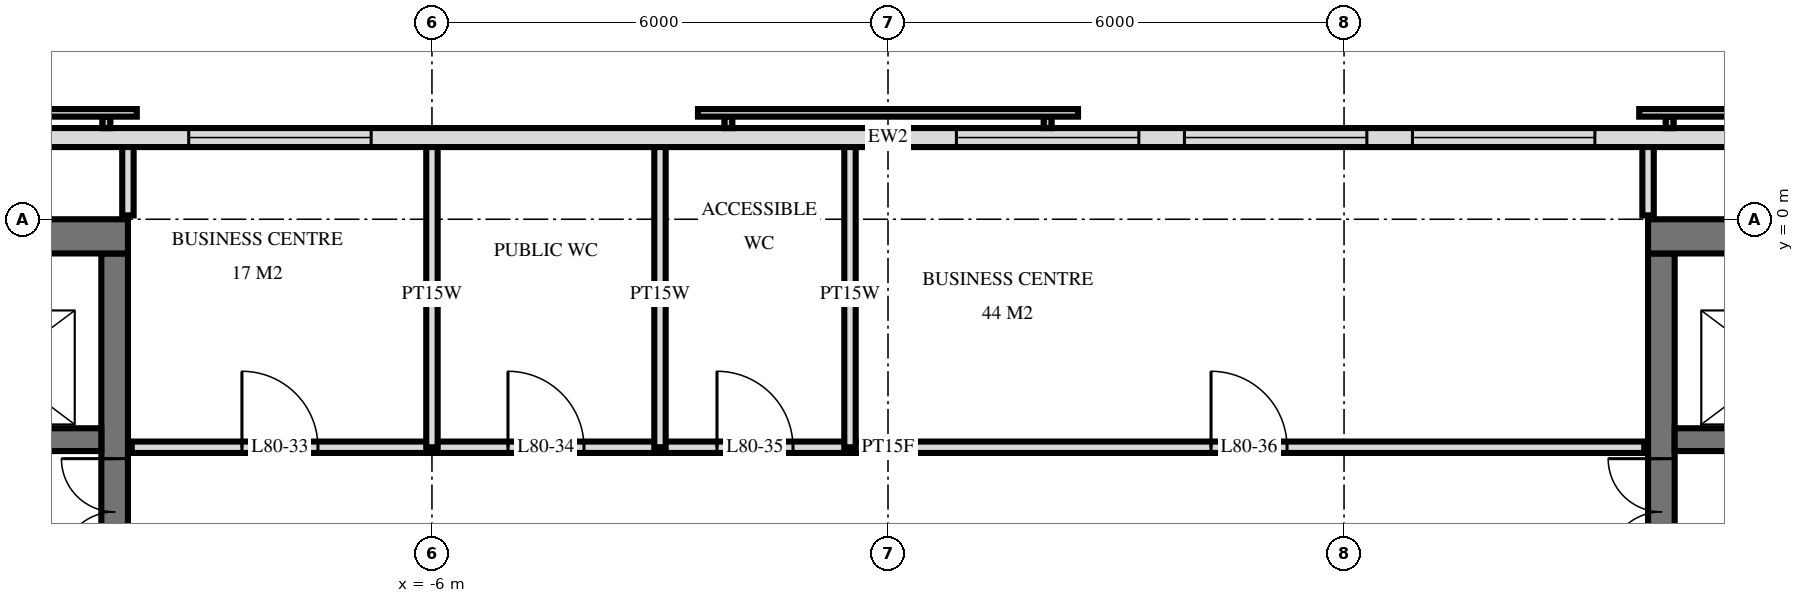
"""IFC4 building model, lengths in metres.
Left out: names, types, materials, properties, quantities, classifications, styles, units other than length and angle.
Written with IfcOpenShell. Run it as: python <this file> out.ifc"""

import sys

from ifc_helpers import new_model, si_unit, direction, frame, frame_2d, origin, place, context, subcontext, project, spatial, rectangle, extrude, element, fill, save


model = new_model("IFC4")
c1 = context("Model", 3, precision=1e-05, world=origin(), true_north=direction((0.0, 1.0)))
c2 = subcontext(c1, "Body", "Model", "MODEL_VIEW")
j1 = project(units=[si_unit("LENGTHUNIT", "METRE"), si_unit("PLANEANGLEUNIT", "RADIAN")], contexts=[c1])
p1 = place(None, origin())
s1 = spatial("IfcSite", under=j1, at=p1, CompositionType="ELEMENT")
p2 = place(p1, origin())
s2 = spatial("IfcBuilding", under=s1, at=p2, CompositionType="ELEMENT")
p3 = place(p2, frame((0.0, 0.0, 301.6)))
s3 = spatial("IfcBuildingStorey", under=s2, at=p3, CompositionType="ELEMENT", Elevation=301.6)
p4 = place(p3, frame((-19.5, -0.225, 0.0), z_axis=(0.0, 0.0, 1.0), x_axis=(1.0, 0.0, 0.0)))
e1 = element("IfcWall", 1, at=p4, inside=s3, PredefinedType="SHEAR", context=c2, shape_type="SweptSolid", body=[
    extrude(rectangle(XDim=9.5, YDim=0.45, at=frame_2d((4.75, 0.0))), origin(), (0.0, 0.0, 1.0), 3.5),
])
p5 = place(p3, frame((-10.175, -14.55, 0.0), z_axis=(0.0, 0.0, 1.0), x_axis=(0.0, 1.0, 0.0)))
e2 = element("IfcWall", 2, at=p5, inside=s3, PredefinedType="SHEAR", context=c2, shape_type="SweptSolid", body=[
    extrude(rectangle(XDim=14.1, YDim=0.35, at=frame_2d((7.05, 0.0))), origin(), (0.0, 0.0, 1.0), 3.5),
])
p6 = place(p5, frame((8.4, 0.0, 0.0)))
e3 = element("IfcOpeningElement", 3, at=p6, cuts=e2, PredefinedType="OPENING", context=c2, shape_type="SweptSolid", body=[
    extrude(rectangle(XDim=1.4, YDim=2.4, at=frame_2d((0.7, 1.2))), frame((0.0, 0.185, 0.0), z_axis=(0.0, -1.0, 0.0), x_axis=(1.0, 0.0, 0.0)), (0.0, 0.0, 1.0), 0.37),
])
p7 = place(p5, frame((10.0, 0.0, 0.0)))
e4 = element("IfcOpeningElement", 4, at=p7, cuts=e2, PredefinedType="OPENING", context=c2, shape_type="SweptSolid", body=[
    extrude(rectangle(XDim=1.4, YDim=2.4, at=frame_2d((0.7, 1.2))), frame((0.0, 0.185, 0.0), z_axis=(0.0, -1.0, 0.0), x_axis=(1.0, 0.0, 0.0)), (0.0, 0.0, 1.0), 0.37),
])
p8 = place(p5, frame((4.0, 0.0, 0.0)))
e5 = element("IfcOpeningElement", 5, at=p8, cuts=e2, PredefinedType="OPENING", context=c2, shape_type="SweptSolid", body=[
    extrude(rectangle(XDim=1.2, YDim=2.1, at=frame_2d((0.6, 1.05))), frame((0.0, 0.185, 0.0), z_axis=(0.0, -1.0, 0.0), x_axis=(1.0, 0.0, 0.0)), (0.0, 0.0, 1.0), 0.37),
])
p9 = place(p3, frame((-19.05, -2.9, 0.0), z_axis=(0.0, 0.0, 1.0), x_axis=(1.0, 0.0, 0.0)))
e6 = element("IfcWall", 6, at=p9, inside=s3, PredefinedType="SHEAR", context=c2, shape_type="SweptSolid", body=[
    extrude(rectangle(XDim=8.7, YDim=0.3, at=frame_2d((4.35, 0.0))), origin(), (0.0, 0.0, 1.0), 3.5),
])
p10 = place(p9, frame((6.8, 0.0, 0.0)))
e7 = element("IfcOpeningElement", 7, at=p10, cuts=e6, PredefinedType="OPENING", context=c2, shape_type="SweptSolid", body=[
    extrude(rectangle(XDim=1.1, YDim=2.1, at=frame_2d((0.55, 1.05))), frame((0.0, 0.16, 0.0), z_axis=(0.0, -1.0, 0.0), x_axis=(1.0, 0.0, 0.0)), (0.0, 0.0, 1.0), 0.32),
])
p11 = place(p9, frame((3.8, 0.0, 0.0)))
e8 = element("IfcOpeningElement", 8, at=p11, cuts=e6, PredefinedType="OPENING", context=c2, shape_type="SweptSolid", body=[
    extrude(rectangle(XDim=1.1, YDim=2.1, at=frame_2d((0.55, 1.05))), frame((0.0, 0.16, 0.0), z_axis=(0.0, -1.0, 0.0), x_axis=(1.0, 0.0, 0.0)), (0.0, 0.0, 1.0), 0.32),
])
p12 = place(p9, frame((1.863, 0.0, 0.0)))
e9 = element("IfcOpeningElement", 9, at=p12, cuts=e6, PredefinedType="OPENING", context=c2, shape_type="SweptSolid", body=[
    extrude(rectangle(XDim=0.9, YDim=2.1, at=frame_2d((0.45, 1.05))), frame((0.0, 0.16, 0.0), z_axis=(0.0, -1.0, 0.0), x_axis=(1.0, 0.0, 0.0)), (0.0, 0.0, 1.0), 0.32),
])
p13 = place(p9, frame((0.438, 0.0, 0.0)))
e10 = element("IfcOpeningElement", 10, at=p13, cuts=e6, PredefinedType="OPENING", context=c2, shape_type="SweptSolid", body=[
    extrude(rectangle(XDim=0.9, YDim=2.1, at=frame_2d((0.45, 1.05))), frame((0.0, 0.16, 0.0), z_axis=(0.0, -1.0, 0.0), x_axis=(1.0, 0.0, 0.0)), (0.0, 0.0, 1.0), 0.32),
])
p14 = place(p3, frame((10.0, -0.225, 0.0), z_axis=(0.0, 0.0, 1.0), x_axis=(1.0, 0.0, 0.0)))
e11 = element("IfcWall", 11, at=p14, inside=s3, PredefinedType="SHEAR", context=c2, shape_type="SweptSolid", body=[
    extrude(rectangle(XDim=9.5, YDim=0.45, at=frame_2d((4.75, 0.0))), origin(), (0.0, 0.0, 1.0), 3.5),
])
p15 = place(p3, frame((10.175, -14.55, 0.0), z_axis=(0.0, 0.0, 1.0), x_axis=(0.0, 1.0, 0.0)))
e12 = element("IfcWall", 12, at=p15, inside=s3, PredefinedType="SHEAR", context=c2, shape_type="SweptSolid", body=[
    extrude(rectangle(XDim=14.1, YDim=0.35, at=frame_2d((7.05, 0.0))), origin(), (0.0, 0.0, 1.0), 3.5),
])
p16 = place(p15, frame((8.4, 0.0, 0.0)))
e13 = element("IfcOpeningElement", 13, at=p16, cuts=e12, PredefinedType="OPENING", context=c2, shape_type="SweptSolid", body=[
    extrude(rectangle(XDim=1.4, YDim=2.4, at=frame_2d((0.7, 1.2))), frame((0.0, 0.185, 0.0), z_axis=(0.0, -1.0, 0.0), x_axis=(1.0, 0.0, 0.0)), (0.0, 0.0, 1.0), 0.37),
])
p17 = place(p15, frame((10.0, 0.0, 0.0)))
e14 = element("IfcOpeningElement", 14, at=p17, cuts=e12, PredefinedType="OPENING", context=c2, shape_type="SweptSolid", body=[
    extrude(rectangle(XDim=1.4, YDim=2.4, at=frame_2d((0.7, 1.2))), frame((0.0, 0.185, 0.0), z_axis=(0.0, -1.0, 0.0), x_axis=(1.0, 0.0, 0.0)), (0.0, 0.0, 1.0), 0.37),
])
p18 = place(p15, frame((4.0, 0.0, 0.0)))
e15 = element("IfcOpeningElement", 15, at=p18, cuts=e12, PredefinedType="OPENING", context=c2, shape_type="SweptSolid", body=[
    extrude(rectangle(XDim=1.2, YDim=2.1, at=frame_2d((0.6, 1.05))), frame((0.0, 0.185, 0.0), z_axis=(0.0, -1.0, 0.0), x_axis=(1.0, 0.0, 0.0)), (0.0, 0.0, 1.0), 0.37),
])
p19 = place(p3, frame((10.35, -2.9, 0.0), z_axis=(0.0, 0.0, 1.0), x_axis=(1.0, 0.0, 0.0)))
e16 = element("IfcWall", 16, at=p19, inside=s3, PredefinedType="SHEAR", context=c2, shape_type="SweptSolid", body=[
    extrude(rectangle(XDim=8.7, YDim=0.3, at=frame_2d((4.35, 0.0))), origin(), (0.0, 0.0, 1.0), 3.5),
])
p20 = place(p19, frame((0.8, 0.0, 0.0)))
e17 = element("IfcOpeningElement", 17, at=p20, cuts=e16, PredefinedType="OPENING", context=c2, shape_type="SweptSolid", body=[
    extrude(rectangle(XDim=1.1, YDim=2.1, at=frame_2d((0.55, 1.05))), frame((0.0, 0.16, 0.0), z_axis=(0.0, -1.0, 0.0), x_axis=(1.0, 0.0, 0.0)), (0.0, 0.0, 1.0), 0.32),
])
p21 = place(p19, frame((3.8, 0.0, 0.0)))
e18 = element("IfcOpeningElement", 18, at=p21, cuts=e16, PredefinedType="OPENING", context=c2, shape_type="SweptSolid", body=[
    extrude(rectangle(XDim=1.1, YDim=2.1, at=frame_2d((0.55, 1.05))), frame((0.0, 0.16, 0.0), z_axis=(0.0, -1.0, 0.0), x_axis=(1.0, 0.0, 0.0)), (0.0, 0.0, 1.0), 0.32),
])
p22 = place(p19, frame((5.938, 0.0, 0.0)))
e19 = element("IfcOpeningElement", 19, at=p22, cuts=e16, PredefinedType="OPENING", context=c2, shape_type="SweptSolid", body=[
    extrude(rectangle(XDim=0.9, YDim=2.1, at=frame_2d((0.45, 1.05))), frame((0.0, 0.16, 0.0), z_axis=(0.0, -1.0, 0.0), x_axis=(1.0, 0.0, 0.0)), (0.0, 0.0, 1.0), 0.32),
])
p23 = place(p19, frame((7.363, 0.0, 0.0)))
e20 = element("IfcOpeningElement", 20, at=p23, cuts=e16, PredefinedType="OPENING", context=c2, shape_type="SweptSolid", body=[
    extrude(rectangle(XDim=0.9, YDim=2.1, at=frame_2d((0.45, 1.05))), frame((0.0, 0.16, 0.0), z_axis=(0.0, -1.0, 0.0), x_axis=(1.0, 0.0, 0.0)), (0.0, 0.0, 1.0), 0.32),
])
p24 = place(p3, frame((18.575, 1.075, 0.0), z_axis=(0.0, 0.0, 1.0), x_axis=(-1.0, 0.0, 0.0)))
e21 = element("IfcWall", 21, at=p24, inside=s3, PredefinedType="SOLIDWALL", context=c2, shape_type="SweptSolid", body=[
    extrude(rectangle(XDim=37.151, YDim=0.25, at=frame_2d((18.575, 0.0))), origin(), (0.0, 0.0, 1.0), 3.22),
])
p25 = place(p24, frame((9.275, 0.0, 0.9)))
e22 = element("IfcOpeningElement", 22, at=p25, cuts=e21, PredefinedType="OPENING", context=c2, shape_type="SweptSolid", body=[
    extrude(rectangle(XDim=2.4, YDim=1.5, at=frame_2d((1.2, 0.75))), frame((0.0, 0.135, 0.0), z_axis=(0.0, -1.0, 0.0), x_axis=(1.0, 0.0, 0.0)), (0.0, 0.0, 1.0), 0.27),
])
p26 = place(p24, frame((12.275, 0.0, 0.9)))
e23 = element("IfcOpeningElement", 23, at=p26, cuts=e21, PredefinedType="OPENING", context=c2, shape_type="SweptSolid", body=[
    extrude(rectangle(XDim=2.4, YDim=1.5, at=frame_2d((1.2, 0.75))), frame((0.0, 0.135, 0.0), z_axis=(0.0, -1.0, 0.0), x_axis=(1.0, 0.0, 0.0)), (0.0, 0.0, 1.0), 0.27),
])
p27 = place(p24, frame((15.275, 0.0, 0.9)))
e24 = element("IfcOpeningElement", 24, at=p27, cuts=e21, PredefinedType="OPENING", context=c2, shape_type="SweptSolid", body=[
    extrude(rectangle(XDim=2.4, YDim=1.5, at=frame_2d((1.2, 0.75))), frame((0.0, 0.135, 0.0), z_axis=(0.0, -1.0, 0.0), x_axis=(1.0, 0.0, 0.0)), (0.0, 0.0, 1.0), 0.27),
])
p28 = place(p24, frame((25.375, 0.0, 0.9)))
e25 = element("IfcOpeningElement", 25, at=p28, cuts=e21, PredefinedType="OPENING", context=c2, shape_type="SweptSolid", body=[
    extrude(rectangle(XDim=2.4, YDim=1.5, at=frame_2d((1.2, 0.75))), frame((0.0, 0.135, 0.0), z_axis=(0.0, -1.0, 0.0), x_axis=(1.0, 0.0, 0.0)), (0.0, 0.0, 1.0), 0.27),
])
p29 = place(p3, frame((10.0, 0.05, 0.0), z_axis=(0.0, 0.0, 1.0), x_axis=(0.0, 1.0, 0.0)))
e26 = element("IfcWall", 26, at=p29, inside=s3, PredefinedType="PARTITIONING", context=c2, shape_type="SweptSolid", body=[
    extrude(rectangle(XDim=0.97, YDim=0.15, at=frame_2d((0.485, 0.0))), origin(), (0.0, 0.0, 1.0), 3.22),
])
for number, where, z_axis, x_axis in (
    (27, (-0.5, -3.0, 0.0), (0.0, 0.0, 1.0), (0.0, 1.0, 0.0)),
    (28, (-3.0, -3.0, 0.0), (0.0, 0.0, 1.0), (0.0, 1.0, 0.0)),
    (29, (-6.0, -3.0, 0.0), (0.0, 0.0, 1.0), (0.0, 1.0, 0.0)),
):
    element("IfcWall", number, at=place(p3, frame(where, z_axis=z_axis, x_axis=x_axis)), inside=s3, PredefinedType="PLUMBINGWALL", context=c2, shape_type="SweptSolid", body=[
        extrude(rectangle(XDim=4.02, YDim=0.15, at=frame_2d((2.01, 0.0))), origin(), (0.0, 0.0, 1.0), 3.22),
    ])
p30 = place(p3, frame((-10.0, 0.05, 0.0), z_axis=(0.0, 0.0, 1.0), x_axis=(0.0, 1.0, 0.0)))
e30 = element("IfcWall", 30, at=p30, inside=s3, PredefinedType="PARTITIONING", context=c2, shape_type="SweptSolid", body=[
    extrude(rectangle(XDim=0.97, YDim=0.15, at=frame_2d((0.485, 0.0))), origin(), (0.0, 0.0, 1.0), 3.22),
])
p31 = place(p3, frame((-9.95, -3.0, 0.0), z_axis=(0.0, 0.0, 1.0), x_axis=(1.0, 0.0, 0.0)))
e31 = element("IfcWall", 31, at=p31, inside=s3, PredefinedType="PARTITIONING", context=c2, shape_type="SweptSolid", body=[
    extrude(rectangle(XDim=19.9, YDim=0.15, at=frame_2d((9.95, 0.0))), origin(), (0.0, 0.0, 1.0), 3.22),
])
p32 = place(p31, frame((1.45, 0.0, 0.0)))
e32 = element("IfcOpeningElement", 32, at=p32, cuts=e31, PredefinedType="OPENING", context=c2, shape_type="SweptSolid", body=[
    extrude(rectangle(XDim=1.0, YDim=2.1, at=frame_2d((0.5, 1.05))), frame((0.0, 0.085, 0.0), z_axis=(0.0, -1.0, 0.0), x_axis=(1.0, 0.0, 0.0)), (0.0, 0.0, 1.0), 0.17),
])
p33 = place(p31, frame((4.95, 0.0, 0.0)))
e33 = element("IfcOpeningElement", 33, at=p33, cuts=e31, PredefinedType="OPENING", context=c2, shape_type="SweptSolid", body=[
    extrude(rectangle(XDim=1.0, YDim=2.1, at=frame_2d((0.5, 1.05))), frame((0.0, 0.085, 0.0), z_axis=(0.0, -1.0, 0.0), x_axis=(1.0, 0.0, 0.0)), (0.0, 0.0, 1.0), 0.17),
])
p34 = place(p31, frame((7.7, 0.0, 0.0)))
e34 = element("IfcOpeningElement", 34, at=p34, cuts=e31, PredefinedType="OPENING", context=c2, shape_type="SweptSolid", body=[
    extrude(rectangle(XDim=1.0, YDim=2.1, at=frame_2d((0.5, 1.05))), frame((0.0, 0.085, 0.0), z_axis=(0.0, -1.0, 0.0), x_axis=(1.0, 0.0, 0.0)), (0.0, 0.0, 1.0), 0.17),
])
p35 = place(p31, frame((14.2, 0.0, 0.0)))
e35 = element("IfcOpeningElement", 35, at=p35, cuts=e31, PredefinedType="OPENING", context=c2, shape_type="SweptSolid", body=[
    extrude(rectangle(XDim=1.0, YDim=2.1, at=frame_2d((0.5, 1.05))), frame((0.0, 0.085, 0.0), z_axis=(0.0, -1.0, 0.0), x_axis=(1.0, 0.0, 0.0)), (0.0, 0.0, 1.0), 0.17),
])
p36 = place(p25, origin())
e36 = element("IfcWindow", 36, at=p36, inside=s3, PartitioningType="SINGLE_PANEL", PredefinedType="WINDOW", context=c2, shape_type="SweptSolid", body=[
    extrude(rectangle(XDim=2.4, YDim=1.5, at=frame_2d((1.2, 0.75))), frame((0.0, 0.03, 0.0), z_axis=(0.0, -1.0, 0.0), x_axis=(1.0, 0.0, 0.0)), (0.0, 0.0, 1.0), 0.06),
])
fill(e22, e36)
p37 = place(p26, origin())
e37 = element("IfcWindow", 37, at=p37, inside=s3, PartitioningType="SINGLE_PANEL", PredefinedType="WINDOW", context=c2, shape_type="SweptSolid", body=[
    extrude(rectangle(XDim=2.4, YDim=1.5, at=frame_2d((1.2, 0.75))), frame((0.0, 0.03, 0.0), z_axis=(0.0, -1.0, 0.0), x_axis=(1.0, 0.0, 0.0)), (0.0, 0.0, 1.0), 0.06),
])
fill(e23, e37)
p38 = place(p27, origin())
e38 = element("IfcWindow", 38, at=p38, inside=s3, PartitioningType="SINGLE_PANEL", PredefinedType="WINDOW", context=c2, shape_type="SweptSolid", body=[
    extrude(rectangle(XDim=2.4, YDim=1.5, at=frame_2d((1.2, 0.75))), frame((0.0, 0.03, 0.0), z_axis=(0.0, -1.0, 0.0), x_axis=(1.0, 0.0, 0.0)), (0.0, 0.0, 1.0), 0.06),
])
fill(e24, e38)
p39 = place(p28, origin())
e39 = element("IfcWindow", 39, at=p39, inside=s3, PartitioningType="SINGLE_PANEL", PredefinedType="WINDOW", context=c2, shape_type="SweptSolid", body=[
    extrude(rectangle(XDim=2.4, YDim=1.5, at=frame_2d((1.2, 0.75))), frame((0.0, 0.03, 0.0), z_axis=(0.0, -1.0, 0.0), x_axis=(1.0, 0.0, 0.0)), (0.0, 0.0, 1.0), 0.06),
])
fill(e25, e39)
p40 = place(p7, origin())
e40 = element("IfcDoor", 40, at=p40, inside=s3, OperationType="DOUBLE_DOOR_SINGLE_SWING", PredefinedType="DOOR", context=c2, shape_type="SweptSolid", body=[
    extrude(rectangle(XDim=1.4, YDim=2.4, at=frame_2d((0.7, 1.2))), frame((0.0, 0.025, 0.0), z_axis=(0.0, -1.0, 0.0), x_axis=(1.0, 0.0, 0.0)), (0.0, 0.0, 1.0), 0.05),
])
fill(e4, e40)
p41 = place(p17, origin())
e41 = element("IfcDoor", 41, at=p41, inside=s3, OperationType="DOUBLE_DOOR_SINGLE_SWING", PredefinedType="DOOR", context=c2, shape_type="SweptSolid", body=[
    extrude(rectangle(XDim=1.4, YDim=2.4, at=frame_2d((0.7, 1.2))), frame((0.0, 0.025, 0.0), z_axis=(0.0, -1.0, 0.0), x_axis=(1.0, 0.0, 0.0)), (0.0, 0.0, 1.0), 0.05),
])
fill(e14, e41)
p42 = place(p32, origin())
e42 = element("IfcDoor", 42, at=p42, inside=s3, OperationType="SINGLE_SWING_RIGHT", PredefinedType="DOOR", context=c2, shape_type="SweptSolid", body=[
    extrude(rectangle(XDim=1.0, YDim=2.1, at=frame_2d((0.5, 1.05))), frame((0.0, 0.025, 0.0), z_axis=(0.0, -1.0, 0.0), x_axis=(1.0, 0.0, 0.0)), (0.0, 0.0, 1.0), 0.05),
])
fill(e32, e42)
p43 = place(p33, origin())
e43 = element("IfcDoor", 43, at=p43, inside=s3, OperationType="SINGLE_SWING_RIGHT", PredefinedType="DOOR", context=c2, shape_type="SweptSolid", body=[
    extrude(rectangle(XDim=1.0, YDim=2.1, at=frame_2d((0.5, 1.05))), frame((0.0, 0.025, 0.0), z_axis=(0.0, -1.0, 0.0), x_axis=(1.0, 0.0, 0.0)), (0.0, 0.0, 1.0), 0.05),
])
fill(e33, e43)
p44 = place(p34, origin())
e44 = element("IfcDoor", 44, at=p44, inside=s3, OperationType="SINGLE_SWING_RIGHT", PredefinedType="DOOR", context=c2, shape_type="SweptSolid", body=[
    extrude(rectangle(XDim=1.0, YDim=2.1, at=frame_2d((0.5, 1.05))), frame((0.0, 0.025, 0.0), z_axis=(0.0, -1.0, 0.0), x_axis=(1.0, 0.0, 0.0)), (0.0, 0.0, 1.0), 0.05),
])
fill(e34, e44)
p45 = place(p35, origin())
e45 = element("IfcDoor", 45, at=p45, inside=s3, OperationType="SINGLE_SWING_RIGHT", PredefinedType="DOOR", context=c2, shape_type="SweptSolid", body=[
    extrude(rectangle(XDim=1.0, YDim=2.1, at=frame_2d((0.5, 1.05))), frame((0.0, 0.025, 0.0), z_axis=(0.0, -1.0, 0.0), x_axis=(1.0, 0.0, 0.0)), (0.0, 0.0, 1.0), 0.05),
])
fill(e35, e45)
save(model, sys.argv[1])
